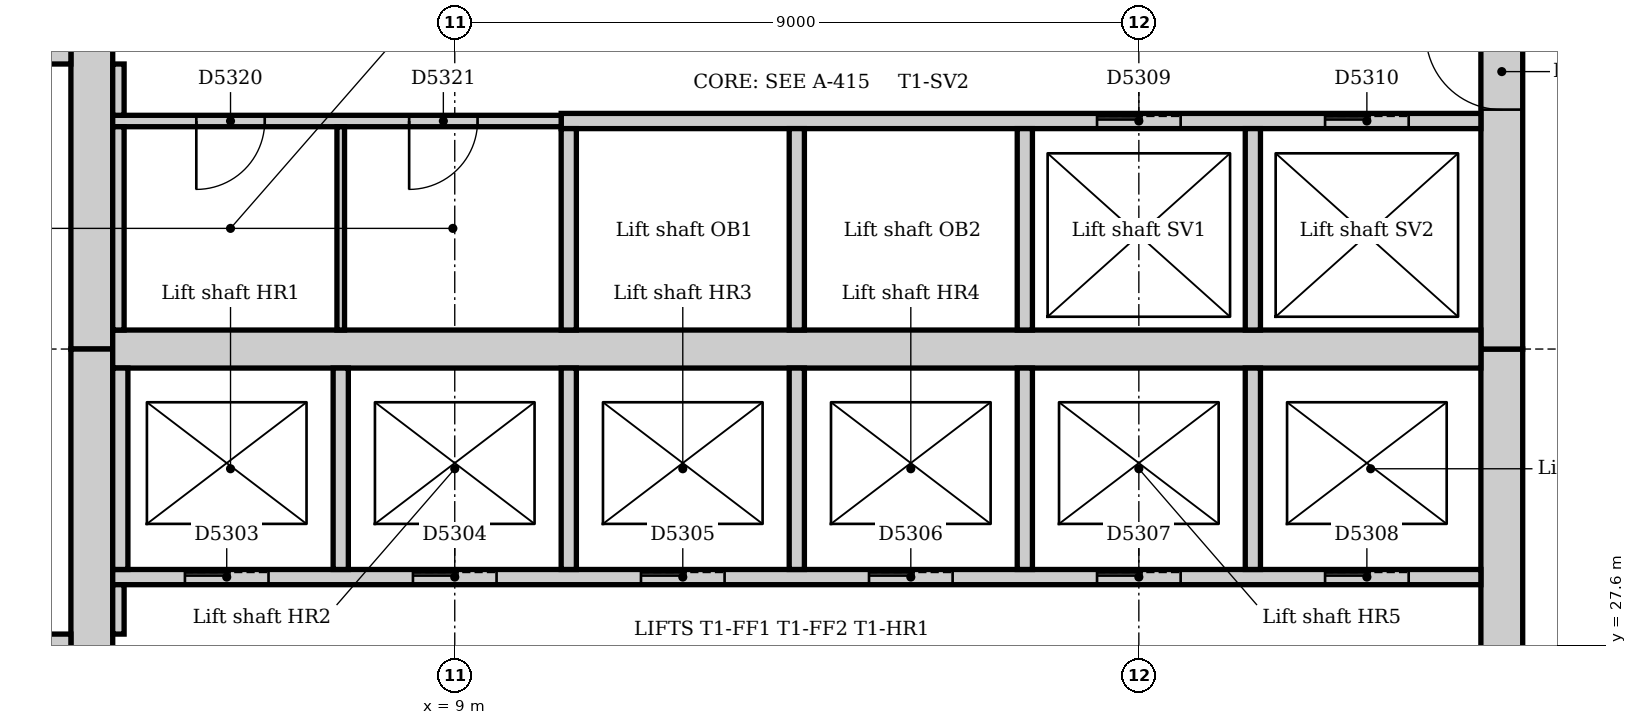
"""IFC4 building model, lengths in metres.
Left out: names, types, materials, properties, quantities, classifications, styles, units other than length and angle.
Written with IfcOpenShell. Run it as: python <this file> out.ifc"""

import sys

from ifc_helpers import new_model, si_unit, direction, frame, frame_2d, origin, place, context, subcontext, project, spatial, rectangle, extrude, element, fill, save


model = new_model("IFC4")
c1 = context("Model", 3, precision=1e-05, world=origin(), true_north=direction((0.0, 1.0)))
c2 = subcontext(c1, "Body", "Model", "MODEL_VIEW")
j1 = project(units=[si_unit("LENGTHUNIT", "METRE"), si_unit("PLANEANGLEUNIT", "RADIAN")], contexts=[c1])
p1 = place(None, origin())
s1 = spatial("IfcSite", under=j1, at=p1, CompositionType="ELEMENT")
p2 = place(p1, origin())
s2 = spatial("IfcBuilding", under=s1, at=p2, CompositionType="ELEMENT")
p3 = place(p2, frame((0.0, 0.0, 238.0)))
s3 = spatial("IfcBuildingStorey", under=s2, at=p3, CompositionType="ELEMENT", Elevation=238.0)
p4 = place(p3, frame((22.775, 21.0, 0.0), z_axis=(0.0, 0.0, 1.0), x_axis=(0.0, 1.0, 0.0)))
e1 = element("IfcWall", 1, at=p4, inside=s3, PredefinedType="SOLIDWALL", context=c2, shape_type="SweptSolid", body=[
    extrude(rectangle(XDim=10.5, YDim=0.55, at=frame_2d((5.25, 0.0))), origin(), (0.0, 0.0, 1.0), 4.0),
])
p5 = place(p4, frame((4.35, 0.0, 0.0)))
e2 = element("IfcOpeningElement", 2, at=p5, cuts=e1, PredefinedType="OPENING", context=c2, shape_type="SweptSolid", body=[
    extrude(rectangle(XDim=1.8, YDim=2.1, at=frame_2d((0.9, 1.05))), frame((0.0, 0.285, 0.0), z_axis=(0.0, -1.0, 0.0), x_axis=(1.0, 0.0, 0.0)), (0.0, 0.0, 1.0), 0.57),
])
p6 = place(p3, frame((22.775, 31.5, 0.0), z_axis=(0.0, 0.0, 1.0), x_axis=(0.0, 1.0, 0.0)))
e3 = element("IfcWall", 3, at=p6, inside=s3, PredefinedType="SOLIDWALL", context=c2, shape_type="SweptSolid", body=[
    extrude(rectangle(XDim=10.5, YDim=0.55, at=frame_2d((5.25, 0.0))), origin(), (0.0, 0.0, 1.0), 4.0),
])
p7 = place(p6, frame((3.15, 0.0, 0.0)))
e4 = element("IfcOpeningElement", 4, at=p7, cuts=e3, PredefinedType="OPENING", context=c2, shape_type="SweptSolid", body=[
    extrude(rectangle(XDim=1.0, YDim=2.1, at=frame_2d((0.5, 1.05))), frame((0.0, 0.285, 0.0), z_axis=(0.0, -1.0, 0.0), x_axis=(1.0, 0.0, 0.0)), (0.0, 0.0, 1.0), 0.57),
])
p8 = place(p6, frame((5.2, 0.0, 0.0)))
e5 = element("IfcOpeningElement", 5, at=p8, cuts=e3, PredefinedType="OPENING", context=c2, shape_type="SweptSolid", body=[
    extrude(rectangle(XDim=1.0, YDim=2.1, at=frame_2d((0.5, 1.05))), frame((0.0, 0.285, 0.0), z_axis=(0.0, -1.0, 0.0), x_axis=(1.0, 0.0, 0.0)), (0.0, 0.0, 1.0), 0.57),
])
p9 = place(p3, frame((4.225, 42.0, 0.0), z_axis=(0.0, 0.0, 1.0), x_axis=(0.0, -1.0, 0.0)))
e6 = element("IfcWall", 6, at=p9, inside=s3, PredefinedType="SOLIDWALL", context=c2, shape_type="SweptSolid", body=[
    extrude(rectangle(XDim=10.5, YDim=0.55, at=frame_2d((5.25, 0.0))), origin(), (0.0, 0.0, 1.0), 4.0),
])
p10 = place(p9, frame((5.3, 0.0, 0.0)))
e7 = element("IfcOpeningElement", 7, at=p10, cuts=e6, PredefinedType="OPENING", context=c2, shape_type="SweptSolid", body=[
    extrude(rectangle(XDim=1.0, YDim=2.1, at=frame_2d((0.5, 1.05))), frame((0.0, 0.285, 0.0), z_axis=(0.0, -1.0, 0.0), x_axis=(1.0, 0.0, 0.0)), (0.0, 0.0, 1.0), 0.57),
])
p11 = place(p3, frame((4.225, 31.5, 0.0), z_axis=(0.0, 0.0, 1.0), x_axis=(0.0, -1.0, 0.0)))
e8 = element("IfcWall", 8, at=p11, inside=s3, PredefinedType="SOLIDWALL", context=c2, shape_type="SweptSolid", body=[
    extrude(rectangle(XDim=10.5, YDim=0.55, at=frame_2d((5.25, 0.0))), origin(), (0.0, 0.0, 1.0), 4.0),
])
p12 = place(p11, frame((4.25, 0.0, 0.0)))
e9 = element("IfcOpeningElement", 9, at=p12, cuts=e8, PredefinedType="OPENING", context=c2, shape_type="SweptSolid", body=[
    extrude(rectangle(XDim=1.0, YDim=2.1, at=frame_2d((0.5, 1.05))), frame((0.0, 0.285, 0.0), z_axis=(0.0, -1.0, 0.0), x_axis=(1.0, 0.0, 0.0)), (0.0, 0.0, 1.0), 0.57),
])
p13 = place(p3, frame((4.5, 31.5, 0.0), z_axis=(0.0, 0.0, 1.0), x_axis=(1.0, 0.0, 0.0)))
e10 = element("IfcWall", 10, at=p13, inside=s3, PredefinedType="SOLIDWALL", context=c2, shape_type="SweptSolid", body=[
    extrude(rectangle(XDim=18.0, YDim=0.5, at=frame_2d((9.0, 0.0))), origin(), (0.0, 0.0, 1.0), 4.0),
])
p14 = place(p3, frame((3.95, 27.625, 0.0), z_axis=(0.0, 0.0, 1.0), x_axis=(-1.0, 0.0, 0.0)))
e11 = element("IfcWall", 11, at=p14, inside=s3, PredefinedType="SOLIDWALL", context=c2, shape_type="SweptSolid", body=[
    extrude(rectangle(XDim=3.59, YDim=0.25, at=frame_2d((1.795, 0.0))), origin(), (0.0, 0.0, 1.0), 4.0),
])
p15 = place(p14, frame((0.45, 0.0, 0.0)))
e12 = element("IfcOpeningElement", 12, at=p15, cuts=e11, PredefinedType="OPENING", context=c2, shape_type="SweptSolid", body=[
    extrude(rectangle(XDim=1.0, YDim=2.1, at=frame_2d((0.5, 1.05))), frame((0.0, 0.135, 0.0), z_axis=(0.0, -1.0, 0.0), x_axis=(1.0, 0.0, 0.0)), (0.0, 0.0, 1.0), 0.27),
])
p16 = place(p3, frame((0.36, 35.375, 0.0), z_axis=(0.0, 0.0, 1.0), x_axis=(1.0, 0.0, 0.0)))
e13 = element("IfcWall", 13, at=p16, inside=s3, PredefinedType="SOLIDWALL", context=c2, shape_type="SweptSolid", body=[
    extrude(rectangle(XDim=3.59, YDim=0.25, at=frame_2d((1.795, 0.0))), origin(), (0.0, 0.0, 1.0), 4.0),
])
p17 = place(p16, frame((2.14, 0.0, 0.0)))
e14 = element("IfcOpeningElement", 14, at=p17, cuts=e13, PredefinedType="OPENING", context=c2, shape_type="SweptSolid", body=[
    extrude(rectangle(XDim=1.0, YDim=2.1, at=frame_2d((0.5, 1.05))), frame((0.0, 0.135, 0.0), z_axis=(0.0, -1.0, 0.0), x_axis=(1.0, 0.0, 0.0)), (0.0, 0.0, 1.0), 0.27),
])
p18 = place(p3, frame((4.5, 28.5, 0.0), z_axis=(0.0, 0.0, 1.0), x_axis=(1.0, 0.0, 0.0)))
e15 = element("IfcWall", 15, at=p18, inside=s3, PredefinedType="PARTITIONING", context=c2, shape_type="SweptSolid", body=[
    extrude(rectangle(XDim=18.0, YDim=0.2, at=frame_2d((9.0, 0.0))), origin(), (0.0, 0.0, 1.0), 3.7),
])
p19 = place(p18, frame((0.95, 0.0, 0.0)))
e16 = element("IfcOpeningElement", 16, at=p19, cuts=e15, PredefinedType="OPENING", context=c2, shape_type="SweptSolid", body=[
    extrude(rectangle(XDim=1.1, YDim=2.1, at=frame_2d((0.55, 1.05))), frame((0.0, 0.11, 0.0), z_axis=(0.0, -1.0, 0.0), x_axis=(1.0, 0.0, 0.0)), (0.0, 0.0, 1.0), 0.22),
])
p20 = place(p18, frame((3.95, 0.0, 0.0)))
e17 = element("IfcOpeningElement", 17, at=p20, cuts=e15, PredefinedType="OPENING", context=c2, shape_type="SweptSolid", body=[
    extrude(rectangle(XDim=1.1, YDim=2.1, at=frame_2d((0.55, 1.05))), frame((0.0, 0.11, 0.0), z_axis=(0.0, -1.0, 0.0), x_axis=(1.0, 0.0, 0.0)), (0.0, 0.0, 1.0), 0.22),
])
p21 = place(p18, frame((6.95, 0.0, 0.0)))
e18 = element("IfcOpeningElement", 18, at=p21, cuts=e15, PredefinedType="OPENING", context=c2, shape_type="SweptSolid", body=[
    extrude(rectangle(XDim=1.1, YDim=2.1, at=frame_2d((0.55, 1.05))), frame((0.0, 0.11, 0.0), z_axis=(0.0, -1.0, 0.0), x_axis=(1.0, 0.0, 0.0)), (0.0, 0.0, 1.0), 0.22),
])
p22 = place(p18, frame((9.95, 0.0, 0.0)))
e19 = element("IfcOpeningElement", 19, at=p22, cuts=e15, PredefinedType="OPENING", context=c2, shape_type="SweptSolid", body=[
    extrude(rectangle(XDim=1.1, YDim=2.1, at=frame_2d((0.55, 1.05))), frame((0.0, 0.11, 0.0), z_axis=(0.0, -1.0, 0.0), x_axis=(1.0, 0.0, 0.0)), (0.0, 0.0, 1.0), 0.22),
])
p23 = place(p18, frame((12.95, 0.0, 0.0)))
e20 = element("IfcOpeningElement", 20, at=p23, cuts=e15, PredefinedType="OPENING", context=c2, shape_type="SweptSolid", body=[
    extrude(rectangle(XDim=1.1, YDim=2.1, at=frame_2d((0.55, 1.05))), frame((0.0, 0.11, 0.0), z_axis=(0.0, -1.0, 0.0), x_axis=(1.0, 0.0, 0.0)), (0.0, 0.0, 1.0), 0.22),
])
p24 = place(p18, frame((15.95, 0.0, 0.0)))
e21 = element("IfcOpeningElement", 21, at=p24, cuts=e15, PredefinedType="OPENING", context=c2, shape_type="SweptSolid", body=[
    extrude(rectangle(XDim=1.1, YDim=2.1, at=frame_2d((0.55, 1.05))), frame((0.0, 0.11, 0.0), z_axis=(0.0, -1.0, 0.0), x_axis=(1.0, 0.0, 0.0)), (0.0, 0.0, 1.0), 0.22),
])
p25 = place(p3, frame((10.4, 34.5, 0.0), z_axis=(0.0, 0.0, 1.0), x_axis=(1.0, 0.0, 0.0)))
e22 = element("IfcWall", 22, at=p25, inside=s3, PredefinedType="PARTITIONING", context=c2, shape_type="SweptSolid", body=[
    extrude(rectangle(XDim=12.1, YDim=0.2, at=frame_2d((6.05, 0.0))), origin(), (0.0, 0.0, 1.0), 3.7),
])
p26 = place(p25, frame((7.05, 0.0, 0.0)))
e23 = element("IfcOpeningElement", 23, at=p26, cuts=e22, PredefinedType="OPENING", context=c2, shape_type="SweptSolid", body=[
    extrude(rectangle(XDim=1.1, YDim=2.1, at=frame_2d((0.55, 1.05))), frame((0.0, 0.11, 0.0), z_axis=(0.0, -1.0, 0.0), x_axis=(1.0, 0.0, 0.0)), (0.0, 0.0, 1.0), 0.22),
])
p27 = place(p25, frame((10.05, 0.0, 0.0)))
e24 = element("IfcOpeningElement", 24, at=p27, cuts=e22, PredefinedType="OPENING", context=c2, shape_type="SweptSolid", body=[
    extrude(rectangle(XDim=1.1, YDim=2.1, at=frame_2d((0.55, 1.05))), frame((0.0, 0.11, 0.0), z_axis=(0.0, -1.0, 0.0), x_axis=(1.0, 0.0, 0.0)), (0.0, 0.0, 1.0), 0.22),
])
for number, where, z_axis, x_axis in (
    (25, (10.5, 28.6, 0.0), (0.0, 0.0, 1.0), (0.0, 1.0, 0.0)),
    (26, (10.5, 31.75, 0.0), (0.0, 0.0, 1.0), (0.0, 1.0, 0.0)),
    (27, (13.5, 28.6, 0.0), (0.0, 0.0, 1.0), (0.0, 1.0, 0.0)),
    (28, (13.5, 31.75, 0.0), (0.0, 0.0, 1.0), (0.0, 1.0, 0.0)),
    (29, (16.5, 28.6, 0.0), (0.0, 0.0, 1.0), (0.0, 1.0, 0.0)),
    (30, (16.5, 31.75, 0.0), (0.0, 0.0, 1.0), (0.0, 1.0, 0.0)),
    (31, (19.5, 28.6, 0.0), (0.0, 0.0, 1.0), (0.0, 1.0, 0.0)),
    (32, (19.5, 31.75, 0.0), (0.0, 0.0, 1.0), (0.0, 1.0, 0.0)),
    (33, (4.6, 28.6, 0.0), (0.0, 0.0, 1.0), (0.0, 1.0, 0.0)),
    (34, (7.5, 28.6, 0.0), (0.0, 0.0, 1.0), (0.0, 1.0, 0.0)),
):
    element("IfcWall", number, at=place(p3, frame(where, z_axis=z_axis, x_axis=x_axis)), inside=s3, PredefinedType="PARTITIONING", context=c2, shape_type="SweptSolid", body=[
        extrude(rectangle(XDim=2.65, YDim=0.2, at=frame_2d((1.325, 0.0))), origin(), (0.0, 0.0, 1.0), 3.7),
    ])
p28 = place(p3, frame((4.5, 34.5, 0.0), z_axis=(0.0, 0.0, 1.0), x_axis=(1.0, 0.0, 0.0)))
e35 = element("IfcWall", 35, at=p28, inside=s3, PredefinedType="PARTITIONING", context=c2, shape_type="SweptSolid", body=[
    extrude(rectangle(XDim=5.9, YDim=0.15, at=frame_2d((2.95, 0.0))), origin(), (0.0, 0.0, 1.0), 3.7),
])
p29 = place(p28, frame((1.1, 0.0, 0.0)))
e36 = element("IfcOpeningElement", 36, at=p29, cuts=e35, PredefinedType="OPENING", context=c2, shape_type="SweptSolid", body=[
    extrude(rectangle(XDim=0.9, YDim=2.1, at=frame_2d((0.45, 1.05))), frame((0.0, 0.085, 0.0), z_axis=(0.0, -1.0, 0.0), x_axis=(1.0, 0.0, 0.0)), (0.0, 0.0, 1.0), 0.17),
])
p30 = place(p28, frame((3.9, 0.0, 0.0)))
e37 = element("IfcOpeningElement", 37, at=p30, cuts=e35, PredefinedType="OPENING", context=c2, shape_type="SweptSolid", body=[
    extrude(rectangle(XDim=0.9, YDim=2.1, at=frame_2d((0.45, 1.05))), frame((0.0, 0.085, 0.0), z_axis=(0.0, -1.0, 0.0), x_axis=(1.0, 0.0, 0.0)), (0.0, 0.0, 1.0), 0.17),
])
p31 = place(p3, frame((4.575, 34.575, 0.0), z_axis=(0.0, 0.0, 1.0), x_axis=(0.0, 1.0, 0.0)))
e38 = element("IfcWall", 38, at=p31, inside=s3, PredefinedType="PARTITIONING", context=c2, shape_type="SweptSolid", body=[
    extrude(rectangle(XDim=0.675, YDim=0.15, at=frame_2d((0.338, 0.0))), origin(), (0.0, 0.0, 1.0), 3.7),
])
p32 = place(p3, frame((4.575, 31.75, 0.0), z_axis=(0.0, 0.0, 1.0), x_axis=(0.0, 1.0, 0.0)))
e39 = element("IfcWall", 39, at=p32, inside=s3, PredefinedType="PARTITIONING", context=c2, shape_type="SweptSolid", body=[
    extrude(rectangle(XDim=2.675, YDim=0.15, at=frame_2d((1.337, 0.0))), origin(), (0.0, 0.0, 1.0), 3.7),
])
p33 = place(p3, frame((4.575, 27.75, 0.0), z_axis=(0.0, 0.0, 1.0), x_axis=(0.0, 1.0, 0.0)))
e40 = element("IfcWall", 40, at=p33, inside=s3, PredefinedType="PARTITIONING", context=c2, shape_type="SweptSolid", body=[
    extrude(rectangle(XDim=0.65, YDim=0.15, at=frame_2d((0.325, 0.0))), origin(), (0.0, 0.0, 1.0), 3.7),
])
p34 = place(p3, frame((7.5, 31.75, 0.0), z_axis=(0.0, 0.0, 1.0), x_axis=(0.0, 1.0, 0.0)))
e41 = element("IfcWall", 41, at=p34, inside=s3, PredefinedType="PARTITIONING", context=c2, shape_type="SweptSolid", body=[
    extrude(rectangle(XDim=2.675, YDim=0.1, at=frame_2d((1.337, 0.0))), origin(), (0.0, 0.0, 1.0), 3.7),
])
p35 = place(p19, origin())
e42 = element("IfcDoor", 42, at=p35, inside=s3, OperationType="SLIDING_TO_LEFT", PredefinedType="DOOR", context=c2, shape_type="SweptSolid", body=[
    extrude(rectangle(XDim=1.1, YDim=2.1, at=frame_2d((0.55, 1.05))), frame((0.0, 0.025, 0.0), z_axis=(0.0, -1.0, 0.0), x_axis=(1.0, 0.0, 0.0)), (0.0, 0.0, 1.0), 0.05),
])
fill(e16, e42)
p36 = place(p20, origin())
e43 = element("IfcDoor", 43, at=p36, inside=s3, OperationType="SLIDING_TO_LEFT", PredefinedType="DOOR", context=c2, shape_type="SweptSolid", body=[
    extrude(rectangle(XDim=1.1, YDim=2.1, at=frame_2d((0.55, 1.05))), frame((0.0, 0.025, 0.0), z_axis=(0.0, -1.0, 0.0), x_axis=(1.0, 0.0, 0.0)), (0.0, 0.0, 1.0), 0.05),
])
fill(e17, e43)
p37 = place(p21, origin())
e44 = element("IfcDoor", 44, at=p37, inside=s3, OperationType="SLIDING_TO_LEFT", PredefinedType="DOOR", context=c2, shape_type="SweptSolid", body=[
    extrude(rectangle(XDim=1.1, YDim=2.1, at=frame_2d((0.55, 1.05))), frame((0.0, 0.025, 0.0), z_axis=(0.0, -1.0, 0.0), x_axis=(1.0, 0.0, 0.0)), (0.0, 0.0, 1.0), 0.05),
])
fill(e18, e44)
p38 = place(p22, origin())
e45 = element("IfcDoor", 45, at=p38, inside=s3, OperationType="SLIDING_TO_LEFT", PredefinedType="DOOR", context=c2, shape_type="SweptSolid", body=[
    extrude(rectangle(XDim=1.1, YDim=2.1, at=frame_2d((0.55, 1.05))), frame((0.0, 0.025, 0.0), z_axis=(0.0, -1.0, 0.0), x_axis=(1.0, 0.0, 0.0)), (0.0, 0.0, 1.0), 0.05),
])
fill(e19, e45)
p39 = place(p23, origin())
e46 = element("IfcDoor", 46, at=p39, inside=s3, OperationType="SLIDING_TO_LEFT", PredefinedType="DOOR", context=c2, shape_type="SweptSolid", body=[
    extrude(rectangle(XDim=1.1, YDim=2.1, at=frame_2d((0.55, 1.05))), frame((0.0, 0.025, 0.0), z_axis=(0.0, -1.0, 0.0), x_axis=(1.0, 0.0, 0.0)), (0.0, 0.0, 1.0), 0.05),
])
fill(e20, e46)
p40 = place(p24, origin())
e47 = element("IfcDoor", 47, at=p40, inside=s3, OperationType="SLIDING_TO_LEFT", PredefinedType="DOOR", context=c2, shape_type="SweptSolid", body=[
    extrude(rectangle(XDim=1.1, YDim=2.1, at=frame_2d((0.55, 1.05))), frame((0.0, 0.025, 0.0), z_axis=(0.0, -1.0, 0.0), x_axis=(1.0, 0.0, 0.0)), (0.0, 0.0, 1.0), 0.05),
])
fill(e21, e47)
p41 = place(p26, origin())
e48 = element("IfcDoor", 48, at=p41, inside=s3, OperationType="SLIDING_TO_LEFT", PredefinedType="DOOR", context=c2, shape_type="SweptSolid", body=[
    extrude(rectangle(XDim=1.1, YDim=2.1, at=frame_2d((0.55, 1.05))), frame((0.0, 0.025, 0.0), z_axis=(0.0, -1.0, 0.0), x_axis=(1.0, 0.0, 0.0)), (0.0, 0.0, 1.0), 0.05),
])
fill(e23, e48)
p42 = place(p27, origin())
e49 = element("IfcDoor", 49, at=p42, inside=s3, OperationType="SLIDING_TO_LEFT", PredefinedType="DOOR", context=c2, shape_type="SweptSolid", body=[
    extrude(rectangle(XDim=1.1, YDim=2.1, at=frame_2d((0.55, 1.05))), frame((0.0, 0.025, 0.0), z_axis=(0.0, -1.0, 0.0), x_axis=(1.0, 0.0, 0.0)), (0.0, 0.0, 1.0), 0.05),
])
fill(e24, e49)
p43 = place(p7, origin())
e50 = element("IfcDoor", 50, at=p43, inside=s3, OperationType="SINGLE_SWING_RIGHT", PredefinedType="DOOR", context=c2, shape_type="SweptSolid", body=[
    extrude(rectangle(XDim=1.0, YDim=2.1, at=frame_2d((0.5, 1.05))), frame((0.0, 0.025, 0.0), z_axis=(0.0, -1.0, 0.0), x_axis=(1.0, 0.0, 0.0)), (0.0, 0.0, 1.0), 0.05),
])
fill(e4, e50)
p44 = place(p29, frame((0.9, 0.0, 0.0), z_axis=(0.0, 0.0, 1.0), x_axis=(-1.0, 0.0, 0.0)))
e51 = element("IfcDoor", 51, at=p44, inside=s3, OperationType="SINGLE_SWING_RIGHT", PredefinedType="DOOR", context=c2, shape_type="SweptSolid", body=[
    extrude(rectangle(XDim=0.9, YDim=2.1, at=frame_2d((0.45, 1.05))), frame((0.0, 0.025, 0.0), z_axis=(0.0, -1.0, 0.0), x_axis=(1.0, 0.0, 0.0)), (0.0, 0.0, 1.0), 0.05),
])
fill(e36, e51)
p45 = place(p30, frame((0.9, 0.0, 0.0), z_axis=(0.0, 0.0, 1.0), x_axis=(-1.0, 0.0, 0.0)))
e52 = element("IfcDoor", 52, at=p45, inside=s3, OperationType="SINGLE_SWING_RIGHT", PredefinedType="DOOR", context=c2, shape_type="SweptSolid", body=[
    extrude(rectangle(XDim=0.9, YDim=2.1, at=frame_2d((0.45, 1.05))), frame((0.0, 0.025, 0.0), z_axis=(0.0, -1.0, 0.0), x_axis=(1.0, 0.0, 0.0)), (0.0, 0.0, 1.0), 0.05),
])
fill(e37, e52)
save(model, sys.argv[1])
